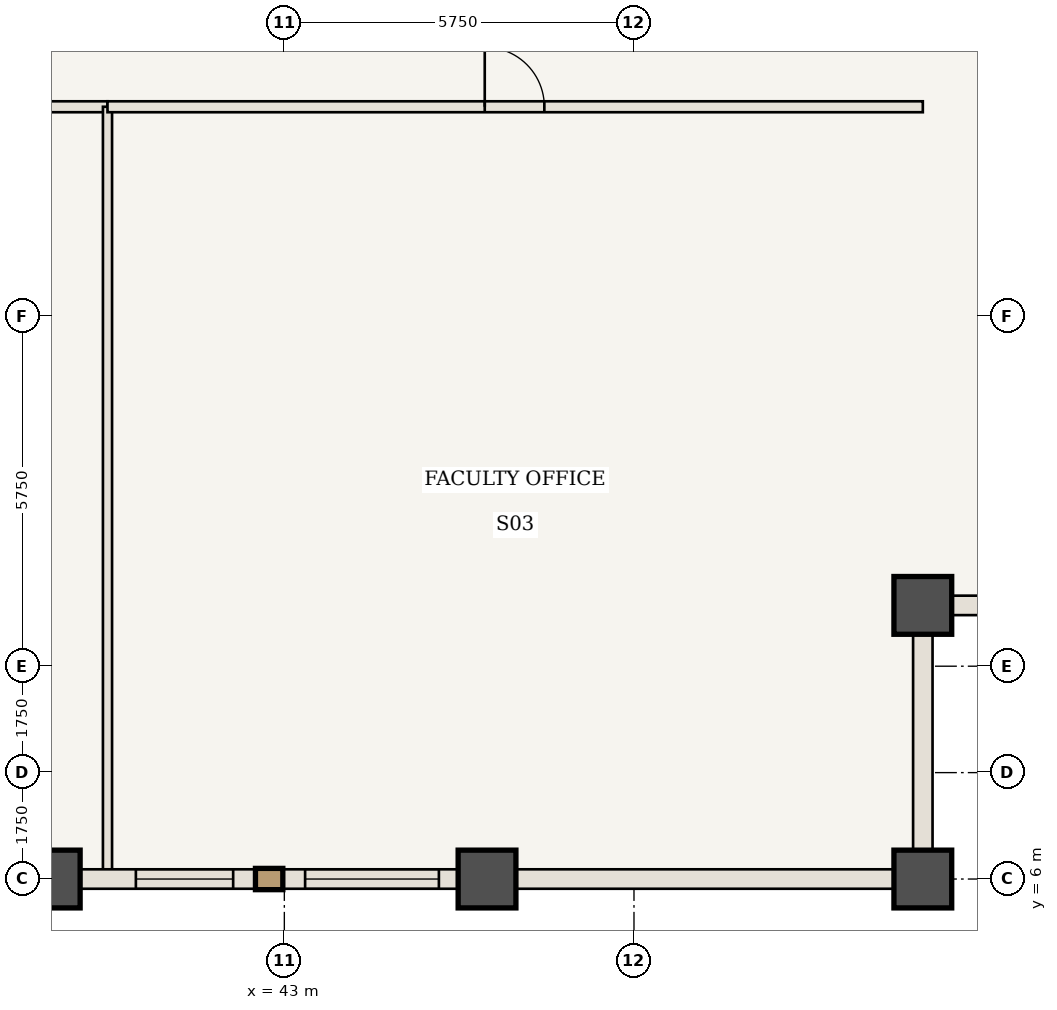
"""IFC4 building model, lengths in metres.
Left out: names, types, materials, properties, quantities, classifications, styles, units other than length and angle.
Written with IfcOpenShell. Run it as: python <this file> out.ifc"""

import sys

from ifc_helpers import new_model, si_unit, direction, frame, frame_2d, origin, origin_2d, place, context, subcontext, project, spatial, rectangle, extrude, element, fill, save


model = new_model("IFC4")
c1 = context("Model", 3, precision=1e-05, world=origin(), true_north=direction((0.0, 1.0)))
c2 = subcontext(c1, "Body", "Model", "MODEL_VIEW")
j1 = project(units=[si_unit("LENGTHUNIT", "METRE"), si_unit("PLANEANGLEUNIT", "RADIAN")], contexts=[c1])
p1 = place(None, origin())
s1 = spatial("IfcSite", under=j1, at=p1, CompositionType="ELEMENT")
p2 = place(p1, origin())
s2 = spatial("IfcBuilding", under=s1, at=p2, CompositionType="ELEMENT")
p3 = place(p2, frame((0.0, 0.0, 133.7)))
s3 = spatial("IfcBuildingStorey", under=s2, at=p3, CompositionType="ELEMENT", Elevation=133.7)
for number, where, z_axis, x_axis in (
    (1, (53.5, 6.0, 0.0), (0.0, 0.0, 1.0), (1.0, 0.0, 0.0)),
    (2, (53.5, 10.5, 0.0), (0.0, 0.0, 1.0), (1.0, 0.0, 0.0)),
    (3, (39.167, 6.0, 0.0), (0.0, 0.0, 1.0), (1.0, 0.0, 0.0)),
    (4, (46.333, 6.0, 0.0), (0.0, 0.0, 1.0), (1.0, 0.0, 0.0)),
):
    element("IfcColumn", number, at=place(p3, frame(where, z_axis=z_axis, x_axis=x_axis)), inside=s3, PredefinedType="COLUMN", context=c2, shape_type="SweptSolid", body=[
        extrude(rectangle(XDim=0.95, YDim=0.95, at=origin_2d()), origin(), (0.0, 0.0, 1.0), 3.85),
    ])
p4 = place(p3, frame((24.058, 18.7, 0.0), z_axis=(0.0, 0.0, 1.0), x_axis=(1.0, 0.0, 0.0)))
e5 = element("IfcWall", 5, at=p4, inside=s3, PredefinedType="STANDARD", context=c2, shape_type="SweptSolid", body=[
    extrude(rectangle(XDim=16.033, YDim=0.18, at=frame_2d((8.017, 0.0))), origin(), (0.0, 0.0, 1.0), 3.685),
])
p5 = place(p4, frame((8.967, 0.0, 0.0)))
e6 = element("IfcOpeningElement", 6, at=p5, cuts=e5, PredefinedType="OPENING", context=c2, shape_type="SweptSolid", body=[
    extrude(rectangle(XDim=0.98, YDim=2.2, at=frame_2d((0.49, 1.1))), frame((0.0, 0.1, 0.0), z_axis=(0.0, -1.0, 0.0), x_axis=(1.0, 0.0, 0.0)), (0.0, 0.0, 1.0), 0.2),
])
p6 = place(p3, frame((40.092, 6.06, 0.0), z_axis=(0.0, 0.0, 1.0), x_axis=(0.0, 1.0, 0.0)))
e7 = element("IfcWall", 7, at=p6, inside=s3, PredefinedType="STANDARD", context=c2, shape_type="SweptSolid", body=[
    extrude(rectangle(XDim=12.64, YDim=0.15, at=frame_2d((6.32, 0.0))), origin(), (0.0, 0.0, 1.0), 3.685),
])
p7 = place(p3, frame((40.092, 18.7, 0.0), z_axis=(0.0, 0.0, 1.0), x_axis=(1.0, 0.0, 0.0)))
e8 = element("IfcWall", 8, at=p7, inside=s3, PredefinedType="STANDARD", context=c2, shape_type="SweptSolid", body=[
    extrude(rectangle(XDim=13.408, YDim=0.18, at=frame_2d((6.704, 0.0))), origin(), (0.0, 0.0, 1.0), 3.685),
])
p8 = place(p7, frame((6.204, 0.0, 0.0)))
e9 = element("IfcOpeningElement", 9, at=p8, cuts=e8, PredefinedType="OPENING", context=c2, shape_type="SweptSolid", body=[
    extrude(rectangle(XDim=0.98, YDim=2.2, at=frame_2d((0.49, 1.1))), frame((0.0, 0.1, 0.0), z_axis=(0.0, -1.0, 0.0), x_axis=(1.0, 0.0, 0.0)), (0.0, 0.0, 1.0), 0.2),
])
p9 = place(p3, frame((46.333, 6.0, 0.0), z_axis=(0.0, 0.0, 1.0), x_axis=(-1.0, 0.0, 0.0)))
e10 = element("IfcWall", 10, at=p9, inside=s3, PredefinedType="USERDEFINED", context=c2, shape_type="SweptSolid", body=[
    extrude(rectangle(XDim=7.167, YDim=0.32, at=frame_2d((3.583, 0.0))), origin(), (0.0, 0.0, 1.0), 2.885),
])
p10 = place(p9, frame((0.792, 0.0, 0.85)))
e11 = element("IfcOpeningElement", 11, at=p10, cuts=e10, PredefinedType="OPENING", context=c2, shape_type="SweptSolid", body=[
    extrude(rectangle(XDim=2.2, YDim=1.835, at=frame_2d((1.1, 0.917))), frame((0.0, 0.17, 0.0), z_axis=(0.0, -1.0, 0.0), x_axis=(1.0, 0.0, 0.0)), (0.0, 0.0, 1.0), 0.34),
])
p11 = place(p9, frame((4.175, 0.0, 0.85)))
e12 = element("IfcOpeningElement", 12, at=p11, cuts=e10, PredefinedType="OPENING", context=c2, shape_type="SweptSolid", body=[
    extrude(rectangle(XDim=1.6, YDim=1.835, at=frame_2d((0.8, 0.917))), frame((0.0, 0.17, 0.0), z_axis=(0.0, -1.0, 0.0), x_axis=(1.0, 0.0, 0.0)), (0.0, 0.0, 1.0), 0.34),
])
p12 = place(p3, frame((53.5, 6.0, 0.0), z_axis=(0.0, 0.0, 1.0), x_axis=(-1.0, 0.0, 0.0)))
e13 = element("IfcWall", 13, at=p12, inside=s3, PredefinedType="USERDEFINED", context=c2, shape_type="SweptSolid", body=[
    extrude(rectangle(XDim=7.167, YDim=0.32, at=frame_2d((3.583, 0.0))), origin(), (0.0, 0.0, 1.0), 2.885),
])
for number, where, z_axis, x_axis in (
    (14, (53.5, 10.5, 0.0), (0.0, 0.0, 1.0), (0.0, -1.0, 0.0)),
    (15, (58.0, 10.5, 0.0), (0.0, 0.0, 1.0), (-1.0, 0.0, 0.0)),
):
    element("IfcWall", number, at=place(p3, frame(where, z_axis=z_axis, x_axis=x_axis)), inside=s3, PredefinedType="USERDEFINED", context=c2, shape_type="SweptSolid", body=[
        extrude(rectangle(XDim=4.5, YDim=0.32, at=frame_2d((2.25, 0.0))), origin(), (0.0, 0.0, 1.0), 2.885),
    ])
p13 = place(p8, origin())
e16 = element("IfcDoor", 16, at=p13, inside=s3, OperationType="SINGLE_SWING_LEFT", PredefinedType="DOOR", context=c2, shape_type="SweptSolid", body=[
    extrude(rectangle(XDim=0.98, YDim=2.2, at=frame_2d((0.49, 1.1))), frame((0.0, 0.025, 0.0), z_axis=(0.0, -1.0, 0.0), x_axis=(1.0, 0.0, 0.0)), (0.0, 0.0, 1.0), 0.05),
])
fill(e9, e16)
p14 = place(p10, origin())
e17 = element("IfcWindow", 17, at=p14, inside=s3, PartitioningType="SINGLE_PANEL", PredefinedType="WINDOW", context=c2, shape_type="SweptSolid", body=[
    extrude(rectangle(XDim=2.2, YDim=1.835, at=frame_2d((1.1, 0.917))), frame((0.0, 0.03, 0.0), z_axis=(0.0, -1.0, 0.0), x_axis=(1.0, 0.0, 0.0)), (0.0, 0.0, 1.0), 0.06),
])
fill(e11, e17)
p15 = place(p11, origin())
e18 = element("IfcWindow", 18, at=p15, inside=s3, PartitioningType="SINGLE_PANEL", PredefinedType="WINDOW", context=c2, shape_type="SweptSolid", body=[
    extrude(rectangle(XDim=1.6, YDim=1.835, at=frame_2d((0.8, 0.917))), frame((0.0, 0.03, 0.0), z_axis=(0.0, -1.0, 0.0), x_axis=(1.0, 0.0, 0.0)), (0.0, 0.0, 1.0), 0.06),
])
fill(e12, e18)
save(model, sys.argv[1])
